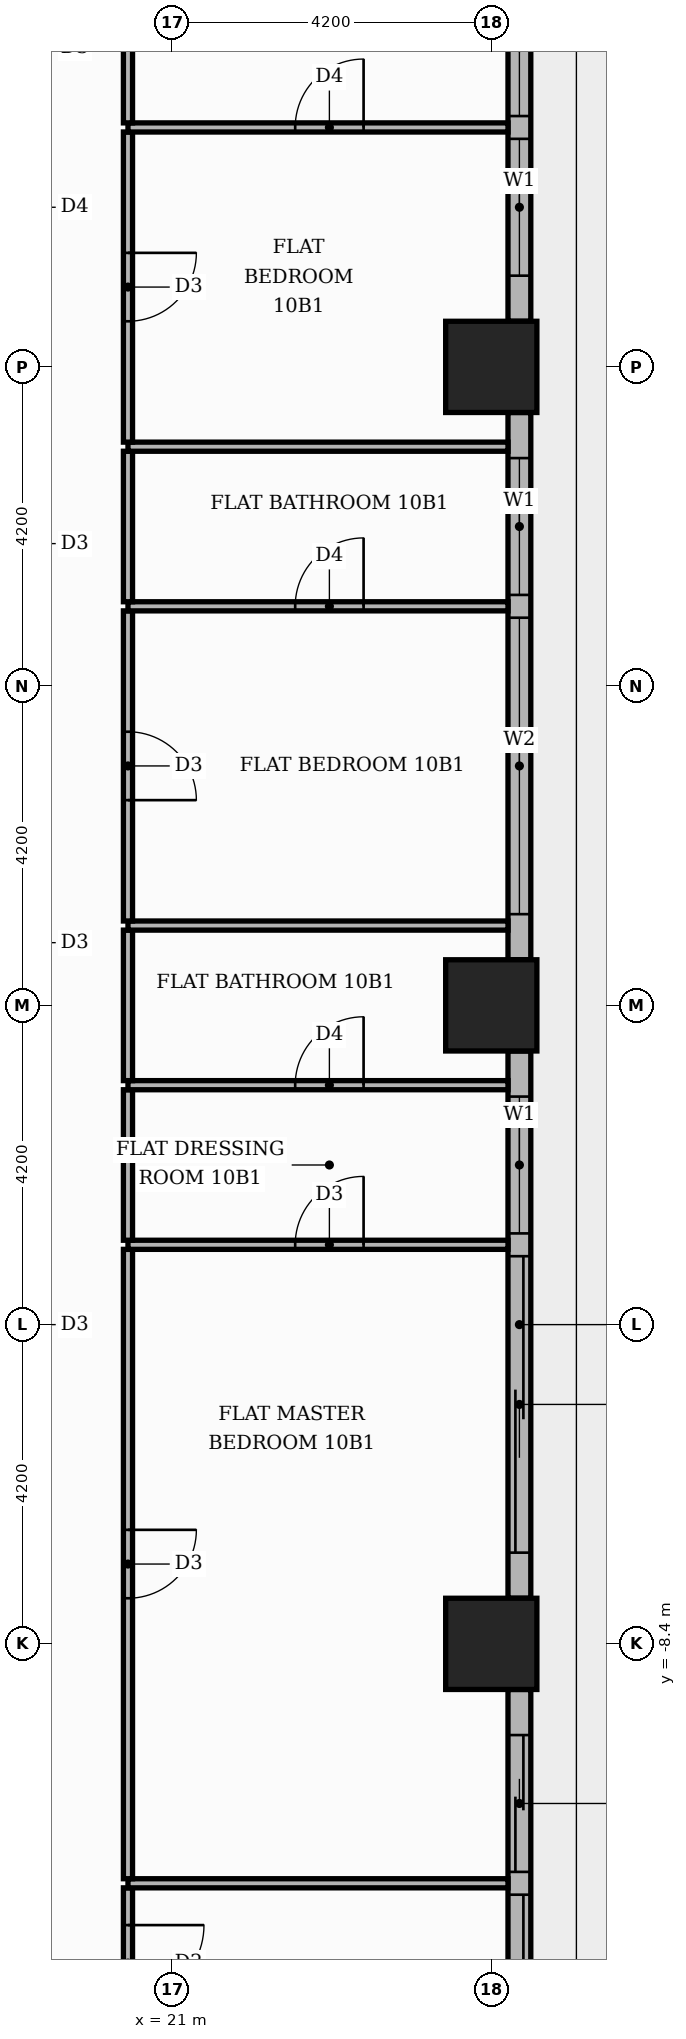
"""IFC4 building model, lengths in metres.
Left out: names, types, materials, properties, quantities, classifications, styles, units other than length and angle.
Written with IfcOpenShell. Run it as: python <this file> out.ifc"""

import sys

from ifc_helpers import new_model, si_unit, direction, frame, frame_2d, origin, origin_2d, place, context, subcontext, project, spatial, rectangle, extrude, element, fill, save


model = new_model("IFC4")
c1 = context("Model", 3, precision=1e-05, world=origin(), true_north=direction((0.0, 1.0)))
c2 = subcontext(c1, "Body", "Model", "MODEL_VIEW")
j1 = project(units=[si_unit("LENGTHUNIT", "METRE"), si_unit("PLANEANGLEUNIT", "RADIAN")], contexts=[c1])
p1 = place(None, origin())
s1 = spatial("IfcSite", under=j1, at=p1, CompositionType="ELEMENT")
p2 = place(p1, origin())
s2 = spatial("IfcBuilding", under=s1, at=p2, CompositionType="ELEMENT")
p3 = place(p2, frame((0.0, 0.0, 46.5)))
s3 = spatial("IfcBuildingStorey", under=s2, at=p3, CompositionType="ELEMENT", Elevation=46.5)
for number, where, z_axis, x_axis in (
    (1, (25.2, 0.0, 0.0), (0.0, 0.0, 1.0), (1.0, 0.0, 0.0)),
    (2, (25.2, 8.4, 0.0), (0.0, 0.0, 1.0), (1.0, 0.0, 0.0)),
    (3, (25.2, -8.4, 0.0), (0.0, 0.0, 1.0), (1.0, 0.0, 0.0)),
):
    element("IfcColumn", number, at=place(p3, frame(where, z_axis=z_axis, x_axis=x_axis)), inside=s3, PredefinedType="COLUMN", context=c2, shape_type="SweptSolid", body=[
        extrude(rectangle(XDim=1.2, YDim=1.2, at=origin_2d()), origin(), (0.0, 0.0, 1.0), 3.9),
    ])
p4 = place(p3, frame((25.57, -16.2, 0.0), z_axis=(0.0, 0.0, 1.0), x_axis=(0.0, 1.0, 0.0)))
e4 = element("IfcWall", 4, at=p4, inside=s3, PredefinedType="STANDARD", context=c2, shape_type="SweptSolid", body=[
    extrude(rectangle(XDim=7.2, YDim=0.3, at=frame_2d((3.6, 0.0))), origin(), (0.0, 0.0, 1.0), 3.48),
])
p5 = place(p4, frame((0.6, 0.0, 0.0)))
e5 = element("IfcOpeningElement", 5, at=p5, cuts=e4, PredefinedType="OPENING", context=c2, shape_type="SweptSolid", body=[
    extrude(rectangle(XDim=3.9, YDim=2.4, at=frame_2d((1.95, 1.2))), frame((0.0, 0.16, 0.0), z_axis=(0.0, -1.0, 0.0), x_axis=(1.0, 0.0, 0.0)), (0.0, 0.0, 1.0), 0.32),
])
p6 = place(p4, frame((4.8, 0.0, 0.0)))
e6 = element("IfcOpeningElement", 6, at=p6, cuts=e4, PredefinedType="OPENING", context=c2, shape_type="SweptSolid", body=[
    extrude(rectangle(XDim=1.8, YDim=2.4, at=frame_2d((0.9, 1.2))), frame((0.0, 0.16, 0.0), z_axis=(0.0, -1.0, 0.0), x_axis=(1.0, 0.0, 0.0)), (0.0, 0.0, 1.0), 0.32),
])
p7 = place(p3, frame((25.57, -7.8, 0.0), z_axis=(0.0, 0.0, 1.0), x_axis=(0.0, 1.0, 0.0)))
e7 = element("IfcWall", 7, at=p7, inside=s3, PredefinedType="STANDARD", context=c2, shape_type="SweptSolid", body=[
    extrude(rectangle(XDim=7.2, YDim=0.3, at=frame_2d((3.6, 0.0))), origin(), (0.0, 0.0, 1.0), 3.48),
])
p8 = place(p7, frame((0.6, 0.0, 0.0)))
e8 = element("IfcOpeningElement", 8, at=p8, cuts=e7, PredefinedType="OPENING", context=c2, shape_type="SweptSolid", body=[
    extrude(rectangle(XDim=3.9, YDim=2.4, at=frame_2d((1.95, 1.2))), frame((0.0, 0.16, 0.0), z_axis=(0.0, -1.0, 0.0), x_axis=(1.0, 0.0, 0.0)), (0.0, 0.0, 1.0), 0.32),
])
p9 = place(p7, frame((4.8, 0.0, 0.9)))
e9 = element("IfcOpeningElement", 9, at=p9, cuts=e7, PredefinedType="OPENING", context=c2, shape_type="SweptSolid", body=[
    extrude(rectangle(XDim=1.8, YDim=2.1, at=frame_2d((0.9, 1.05))), frame((0.0, 0.16, 0.0), z_axis=(0.0, -1.0, 0.0), x_axis=(1.0, 0.0, 0.0)), (0.0, 0.0, 1.0), 0.32),
])
p10 = place(p3, frame((25.57, 0.6, 0.0), z_axis=(0.0, 0.0, 1.0), x_axis=(0.0, 1.0, 0.0)))
e10 = element("IfcWall", 10, at=p10, inside=s3, PredefinedType="STANDARD", context=c2, shape_type="SweptSolid", body=[
    extrude(rectangle(XDim=7.2, YDim=0.3, at=frame_2d((3.6, 0.0))), origin(), (0.0, 0.0, 1.0), 3.48),
])
p11 = place(p10, frame((0.6, 0.0, 0.9)))
e11 = element("IfcOpeningElement", 11, at=p11, cuts=e10, PredefinedType="OPENING", context=c2, shape_type="SweptSolid", body=[
    extrude(rectangle(XDim=3.9, YDim=2.1, at=frame_2d((1.95, 1.05))), frame((0.0, 0.16, 0.0), z_axis=(0.0, -1.0, 0.0), x_axis=(1.0, 0.0, 0.0)), (0.0, 0.0, 1.0), 0.32),
])
p12 = place(p10, frame((4.8, 0.0, 0.9)))
e12 = element("IfcOpeningElement", 12, at=p12, cuts=e10, PredefinedType="OPENING", context=c2, shape_type="SweptSolid", body=[
    extrude(rectangle(XDim=1.8, YDim=2.1, at=frame_2d((0.9, 1.05))), frame((0.0, 0.16, 0.0), z_axis=(0.0, -1.0, 0.0), x_axis=(1.0, 0.0, 0.0)), (0.0, 0.0, 1.0), 0.32),
])
p13 = place(p3, frame((25.57, 9.0, 0.0), z_axis=(0.0, 0.0, 1.0), x_axis=(0.0, 1.0, 0.0)))
e13 = element("IfcWall", 13, at=p13, inside=s3, PredefinedType="STANDARD", context=c2, shape_type="SweptSolid", body=[
    extrude(rectangle(XDim=7.2, YDim=0.3, at=frame_2d((3.6, 0.0))), origin(), (0.0, 0.0, 1.0), 3.48),
])
p14 = place(p13, frame((0.6, 0.0, 0.9)))
e14 = element("IfcOpeningElement", 14, at=p14, cuts=e13, PredefinedType="OPENING", context=c2, shape_type="SweptSolid", body=[
    extrude(rectangle(XDim=1.8, YDim=2.1, at=frame_2d((0.9, 1.05))), frame((0.0, 0.16, 0.0), z_axis=(0.0, -1.0, 0.0), x_axis=(1.0, 0.0, 0.0)), (0.0, 0.0, 1.0), 0.32),
])
p15 = place(p13, frame((2.7, 0.0, 0.9)))
e15 = element("IfcOpeningElement", 15, at=p15, cuts=e13, PredefinedType="OPENING", context=c2, shape_type="SweptSolid", body=[
    extrude(rectangle(XDim=1.8, YDim=2.1, at=frame_2d((0.9, 1.05))), frame((0.0, 0.16, 0.0), z_axis=(0.0, -1.0, 0.0), x_axis=(1.0, 0.0, 0.0)), (0.0, 0.0, 1.0), 0.32),
])
p16 = place(p13, frame((4.8, 0.0, 0.9)))
e16 = element("IfcOpeningElement", 16, at=p16, cuts=e13, PredefinedType="OPENING", context=c2, shape_type="SweptSolid", body=[
    extrude(rectangle(XDim=1.8, YDim=2.1, at=frame_2d((0.9, 1.05))), frame((0.0, 0.16, 0.0), z_axis=(0.0, -1.0, 0.0), x_axis=(1.0, 0.0, 0.0)), (0.0, 0.0, 1.0), 0.32),
])
p17 = place(p3, frame((20.42, -13.59, 0.0), z_axis=(0.0, 0.0, 1.0), x_axis=(0.0, 1.0, 0.0)))
e17 = element("IfcWall", 17, at=p17, inside=s3, PredefinedType="PARTITIONING", context=c2, shape_type="SweptSolid", body=[
    extrude(rectangle(XDim=1.98, YDim=0.12, at=frame_2d((0.99, 0.0))), origin(), (0.0, 0.0, 1.0), 3.48),
])
p18 = place(p17, frame((0.49, 0.0, 0.0)))
e18 = element("IfcOpeningElement", 18, at=p18, cuts=e17, PredefinedType="OPENING", context=c2, shape_type="SweptSolid", body=[
    extrude(rectangle(XDim=1.0, YDim=2.1, at=frame_2d((0.5, 1.05))), frame((0.0, 0.07, 0.0), z_axis=(0.0, -1.0, 0.0), x_axis=(1.0, 0.0, 0.0)), (0.0, 0.0, 1.0), 0.14),
])
p19 = place(p3, frame((20.42, -11.55, 0.0), z_axis=(0.0, 0.0, 1.0), x_axis=(1.0, 0.0, 0.0)))
e19 = element("IfcWall", 19, at=p19, inside=s3, PredefinedType="PARTITIONING", context=c2, shape_type="SweptSolid", body=[
    extrude(rectangle(XDim=5.0, YDim=0.12, at=frame_2d((2.5, 0.0))), origin(), (0.0, 0.0, 1.0), 3.48),
])
p20 = place(p3, frame((20.42, -11.49, 0.0), z_axis=(0.0, 0.0, 1.0), x_axis=(0.0, 1.0, 0.0)))
e20 = element("IfcWall", 20, at=p20, inside=s3, PredefinedType="PARTITIONING", context=c2, shape_type="SweptSolid", body=[
    extrude(rectangle(XDim=8.28, YDim=0.12, at=frame_2d((4.14, 0.0))), origin(), (0.0, 0.0, 1.0), 3.48),
])
p21 = place(p20, frame((3.69, 0.0, 0.0)))
e21 = element("IfcOpeningElement", 21, at=p21, cuts=e20, PredefinedType="OPENING", context=c2, shape_type="SweptSolid", body=[
    extrude(rectangle(XDim=0.9, YDim=2.1, at=frame_2d((0.45, 1.05))), frame((0.0, 0.07, 0.0), z_axis=(0.0, -1.0, 0.0), x_axis=(1.0, 0.0, 0.0)), (0.0, 0.0, 1.0), 0.14),
])
p22 = place(p3, frame((20.42, -3.15, 0.0), z_axis=(0.0, 0.0, 1.0), x_axis=(1.0, 0.0, 0.0)))
e22 = element("IfcWall", 22, at=p22, inside=s3, PredefinedType="PARTITIONING", context=c2, shape_type="SweptSolid", body=[
    extrude(rectangle(XDim=5.0, YDim=0.12, at=frame_2d((2.5, 0.0))), origin(), (0.0, 0.0, 1.0), 3.48),
])
p23 = place(p22, frame((2.2, 0.0, 0.0)))
e23 = element("IfcOpeningElement", 23, at=p23, cuts=e22, PredefinedType="OPENING", context=c2, shape_type="SweptSolid", body=[
    extrude(rectangle(XDim=0.9, YDim=2.1, at=frame_2d((0.45, 1.05))), frame((0.0, 0.07, 0.0), z_axis=(0.0, -1.0, 0.0), x_axis=(1.0, 0.0, 0.0)), (0.0, 0.0, 1.0), 0.14),
])
p24 = place(p3, frame((20.42, -3.09, 0.0), z_axis=(0.0, 0.0, 1.0), x_axis=(0.0, 1.0, 0.0)))
e24 = element("IfcWall", 24, at=p24, inside=s3, PredefinedType="PARTITIONING", context=c2, shape_type="SweptSolid", body=[
    extrude(rectangle(XDim=1.98, YDim=0.12, at=frame_2d((0.99, 0.0))), origin(), (0.0, 0.0, 1.0), 3.48),
])
p25 = place(p3, frame((20.42, -1.05, 0.0), z_axis=(0.0, 0.0, 1.0), x_axis=(1.0, 0.0, 0.0)))
e25 = element("IfcWall", 25, at=p25, inside=s3, PredefinedType="PARTITIONING", context=c2, shape_type="SweptSolid", body=[
    extrude(rectangle(XDim=5.0, YDim=0.12, at=frame_2d((2.5, 0.0))), origin(), (0.0, 0.0, 1.0), 3.48),
])
p26 = place(p25, frame((2.2, 0.0, 0.0)))
e26 = element("IfcOpeningElement", 26, at=p26, cuts=e25, PredefinedType="OPENING", context=c2, shape_type="SweptSolid", body=[
    extrude(rectangle(XDim=0.9, YDim=2.1, at=frame_2d((0.45, 1.05))), frame((0.0, 0.07, 0.0), z_axis=(0.0, -1.0, 0.0), x_axis=(1.0, 0.0, 0.0)), (0.0, 0.0, 1.0), 0.14),
])
p27 = place(p3, frame((20.42, -0.99, 0.0), z_axis=(0.0, 0.0, 1.0), x_axis=(0.0, 1.0, 0.0)))
e27 = element("IfcWall", 27, at=p27, inside=s3, PredefinedType="PARTITIONING", context=c2, shape_type="SweptSolid", body=[
    extrude(rectangle(XDim=1.98, YDim=0.12, at=frame_2d((0.99, 0.0))), origin(), (0.0, 0.0, 1.0), 3.48),
])
p28 = place(p3, frame((20.42, 1.05, 0.0), z_axis=(0.0, 0.0, 1.0), x_axis=(1.0, 0.0, 0.0)))
e28 = element("IfcWall", 28, at=p28, inside=s3, PredefinedType="PARTITIONING", context=c2, shape_type="SweptSolid", body=[
    extrude(rectangle(XDim=5.0, YDim=0.12, at=frame_2d((2.5, 0.0))), origin(), (0.0, 0.0, 1.0), 3.48),
])
p29 = place(p3, frame((20.42, 1.11, 0.0), z_axis=(0.0, 0.0, 1.0), x_axis=(0.0, 1.0, 0.0)))
e29 = element("IfcWall", 29, at=p29, inside=s3, PredefinedType="PARTITIONING", context=c2, shape_type="SweptSolid", body=[
    extrude(rectangle(XDim=4.08, YDim=0.12, at=frame_2d((2.04, 0.0))), origin(), (0.0, 0.0, 1.0), 3.48),
])
p30 = place(p29, frame((1.59, 0.0, 0.0)))
e30 = element("IfcOpeningElement", 30, at=p30, cuts=e29, PredefinedType="OPENING", context=c2, shape_type="SweptSolid", body=[
    extrude(rectangle(XDim=0.9, YDim=2.1, at=frame_2d((0.45, 1.05))), frame((0.0, 0.07, 0.0), z_axis=(0.0, -1.0, 0.0), x_axis=(1.0, 0.0, 0.0)), (0.0, 0.0, 1.0), 0.14),
])
p31 = place(p3, frame((20.42, 5.25, 0.0), z_axis=(0.0, 0.0, 1.0), x_axis=(1.0, 0.0, 0.0)))
e31 = element("IfcWall", 31, at=p31, inside=s3, PredefinedType="PARTITIONING", context=c2, shape_type="SweptSolid", body=[
    extrude(rectangle(XDim=5.0, YDim=0.12, at=frame_2d((2.5, 0.0))), origin(), (0.0, 0.0, 1.0), 3.48),
])
p32 = place(p31, frame((2.2, 0.0, 0.0)))
e32 = element("IfcOpeningElement", 32, at=p32, cuts=e31, PredefinedType="OPENING", context=c2, shape_type="SweptSolid", body=[
    extrude(rectangle(XDim=0.9, YDim=2.1, at=frame_2d((0.45, 1.05))), frame((0.0, 0.07, 0.0), z_axis=(0.0, -1.0, 0.0), x_axis=(1.0, 0.0, 0.0)), (0.0, 0.0, 1.0), 0.14),
])
p33 = place(p3, frame((20.42, 5.31, 0.0), z_axis=(0.0, 0.0, 1.0), x_axis=(0.0, 1.0, 0.0)))
e33 = element("IfcWall", 33, at=p33, inside=s3, PredefinedType="PARTITIONING", context=c2, shape_type="SweptSolid", body=[
    extrude(rectangle(XDim=1.98, YDim=0.12, at=frame_2d((0.99, 0.0))), origin(), (0.0, 0.0, 1.0), 3.48),
])
p34 = place(p3, frame((20.42, 7.35, 0.0), z_axis=(0.0, 0.0, 1.0), x_axis=(1.0, 0.0, 0.0)))
e34 = element("IfcWall", 34, at=p34, inside=s3, PredefinedType="PARTITIONING", context=c2, shape_type="SweptSolid", body=[
    extrude(rectangle(XDim=5.0, YDim=0.12, at=frame_2d((2.5, 0.0))), origin(), (0.0, 0.0, 1.0), 3.48),
])
p35 = place(p3, frame((20.42, 7.41, 0.0), z_axis=(0.0, 0.0, 1.0), x_axis=(0.0, 1.0, 0.0)))
e35 = element("IfcWall", 35, at=p35, inside=s3, PredefinedType="PARTITIONING", context=c2, shape_type="SweptSolid", body=[
    extrude(rectangle(XDim=4.08, YDim=0.12, at=frame_2d((2.04, 0.0))), origin(), (0.0, 0.0, 1.0), 3.48),
])
p36 = place(p35, frame((1.59, 0.0, 0.0)))
e36 = element("IfcOpeningElement", 36, at=p36, cuts=e35, PredefinedType="OPENING", context=c2, shape_type="SweptSolid", body=[
    extrude(rectangle(XDim=0.9, YDim=2.1, at=frame_2d((0.45, 1.05))), frame((0.0, 0.07, 0.0), z_axis=(0.0, -1.0, 0.0), x_axis=(1.0, 0.0, 0.0)), (0.0, 0.0, 1.0), 0.14),
])
p37 = place(p3, frame((20.42, 11.55, 0.0), z_axis=(0.0, 0.0, 1.0), x_axis=(1.0, 0.0, 0.0)))
e37 = element("IfcWall", 37, at=p37, inside=s3, PredefinedType="PARTITIONING", context=c2, shape_type="SweptSolid", body=[
    extrude(rectangle(XDim=5.0, YDim=0.12, at=frame_2d((2.5, 0.0))), origin(), (0.0, 0.0, 1.0), 3.48),
])
p38 = place(p37, frame((2.2, 0.0, 0.0)))
e38 = element("IfcOpeningElement", 38, at=p38, cuts=e37, PredefinedType="OPENING", context=c2, shape_type="SweptSolid", body=[
    extrude(rectangle(XDim=0.9, YDim=2.1, at=frame_2d((0.45, 1.05))), frame((0.0, 0.07, 0.0), z_axis=(0.0, -1.0, 0.0), x_axis=(1.0, 0.0, 0.0)), (0.0, 0.0, 1.0), 0.14),
])
p39 = place(p3, frame((20.42, 11.61, 0.0), z_axis=(0.0, 0.0, 1.0), x_axis=(0.0, 1.0, 0.0)))
e39 = element("IfcWall", 39, at=p39, inside=s3, PredefinedType="PARTITIONING", context=c2, shape_type="SweptSolid", body=[
    extrude(rectangle(XDim=1.94, YDim=0.12, at=frame_2d((0.97, 0.0))), origin(), (0.0, 0.0, 1.0), 3.48),
])
p40 = place(p5, origin())
e40 = element("IfcDoor", 40, at=p40, inside=s3, OperationType="SLIDING_TO_LEFT", PredefinedType="DOOR", context=c2, shape_type="SweptSolid", body=[
    extrude(rectangle(XDim=3.9, YDim=2.4, at=frame_2d((1.95, 1.2))), frame((0.0, 0.025, 0.0), z_axis=(0.0, -1.0, 0.0), x_axis=(1.0, 0.0, 0.0)), (0.0, 0.0, 1.0), 0.05),
])
fill(e5, e40)
p41 = place(p6, origin())
e41 = element("IfcDoor", 41, at=p41, inside=s3, OperationType="SLIDING_TO_RIGHT", PredefinedType="DOOR", context=c2, shape_type="SweptSolid", body=[
    extrude(rectangle(XDim=1.8, YDim=2.4, at=frame_2d((0.9, 1.2))), frame((0.0, 0.025, 0.0), z_axis=(0.0, -1.0, 0.0), x_axis=(1.0, 0.0, 0.0)), (0.0, 0.0, 1.0), 0.05),
])
fill(e6, e41)
p42 = place(p8, origin())
e42 = element("IfcDoor", 42, at=p42, inside=s3, OperationType="SLIDING_TO_LEFT", PredefinedType="DOOR", context=c2, shape_type="SweptSolid", body=[
    extrude(rectangle(XDim=3.9, YDim=2.4, at=frame_2d((1.95, 1.2))), frame((0.0, 0.025, 0.0), z_axis=(0.0, -1.0, 0.0), x_axis=(1.0, 0.0, 0.0)), (0.0, 0.0, 1.0), 0.05),
])
fill(e8, e42)
p43 = place(p9, origin())
e43 = element("IfcWindow", 43, at=p43, inside=s3, PartitioningType="SINGLE_PANEL", PredefinedType="WINDOW", context=c2, shape_type="SweptSolid", body=[
    extrude(rectangle(XDim=1.8, YDim=2.1, at=frame_2d((0.9, 1.05))), frame((0.0, 0.03, 0.0), z_axis=(0.0, -1.0, 0.0), x_axis=(1.0, 0.0, 0.0)), (0.0, 0.0, 1.0), 0.06),
])
fill(e9, e43)
p44 = place(p11, origin())
e44 = element("IfcWindow", 44, at=p44, inside=s3, PartitioningType="SINGLE_PANEL", PredefinedType="WINDOW", context=c2, shape_type="SweptSolid", body=[
    extrude(rectangle(XDim=3.9, YDim=2.1, at=frame_2d((1.95, 1.05))), frame((0.0, 0.03, 0.0), z_axis=(0.0, -1.0, 0.0), x_axis=(1.0, 0.0, 0.0)), (0.0, 0.0, 1.0), 0.06),
])
fill(e11, e44)
p45 = place(p12, origin())
e45 = element("IfcWindow", 45, at=p45, inside=s3, PartitioningType="SINGLE_PANEL", PredefinedType="WINDOW", context=c2, shape_type="SweptSolid", body=[
    extrude(rectangle(XDim=1.8, YDim=2.1, at=frame_2d((0.9, 1.05))), frame((0.0, 0.03, 0.0), z_axis=(0.0, -1.0, 0.0), x_axis=(1.0, 0.0, 0.0)), (0.0, 0.0, 1.0), 0.06),
])
fill(e12, e45)
p46 = place(p14, origin())
e46 = element("IfcWindow", 46, at=p46, inside=s3, PartitioningType="SINGLE_PANEL", PredefinedType="WINDOW", context=c2, shape_type="SweptSolid", body=[
    extrude(rectangle(XDim=1.8, YDim=2.1, at=frame_2d((0.9, 1.05))), frame((0.0, 0.03, 0.0), z_axis=(0.0, -1.0, 0.0), x_axis=(1.0, 0.0, 0.0)), (0.0, 0.0, 1.0), 0.06),
])
fill(e14, e46)
p47 = place(p15, origin())
e47 = element("IfcWindow", 47, at=p47, inside=s3, PartitioningType="SINGLE_PANEL", PredefinedType="WINDOW", context=c2, shape_type="SweptSolid", body=[
    extrude(rectangle(XDim=1.8, YDim=2.1, at=frame_2d((0.9, 1.05))), frame((0.0, 0.03, 0.0), z_axis=(0.0, -1.0, 0.0), x_axis=(1.0, 0.0, 0.0)), (0.0, 0.0, 1.0), 0.06),
])
fill(e15, e47)
p48 = place(p18, frame((1.0, 0.0, 0.0), z_axis=(0.0, 0.0, 1.0), x_axis=(-1.0, 0.0, 0.0)))
e48 = element("IfcDoor", 48, at=p48, inside=s3, OperationType="SINGLE_SWING_RIGHT", PredefinedType="DOOR", context=c2, shape_type="SweptSolid", body=[
    extrude(rectangle(XDim=1.0, YDim=2.1, at=frame_2d((0.5, 1.05))), frame((0.0, 0.025, 0.0), z_axis=(0.0, -1.0, 0.0), x_axis=(1.0, 0.0, 0.0)), (0.0, 0.0, 1.0), 0.05),
])
fill(e18, e48)
p49 = place(p21, frame((0.9, 0.0, 0.0), z_axis=(0.0, 0.0, 1.0), x_axis=(-1.0, 0.0, 0.0)))
e49 = element("IfcDoor", 49, at=p49, inside=s3, OperationType="SINGLE_SWING_RIGHT", PredefinedType="DOOR", context=c2, shape_type="SweptSolid", body=[
    extrude(rectangle(XDim=0.9, YDim=2.1, at=frame_2d((0.45, 1.05))), frame((0.0, 0.025, 0.0), z_axis=(0.0, -1.0, 0.0), x_axis=(1.0, 0.0, 0.0)), (0.0, 0.0, 1.0), 0.05),
])
fill(e21, e49)
p50 = place(p23, origin())
e50 = element("IfcDoor", 50, at=p50, inside=s3, OperationType="SINGLE_SWING_RIGHT", PredefinedType="DOOR", context=c2, shape_type="SweptSolid", body=[
    extrude(rectangle(XDim=0.9, YDim=2.1, at=frame_2d((0.45, 1.05))), frame((0.0, 0.025, 0.0), z_axis=(0.0, -1.0, 0.0), x_axis=(1.0, 0.0, 0.0)), (0.0, 0.0, 1.0), 0.05),
])
fill(e23, e50)
p51 = place(p26, origin())
e51 = element("IfcDoor", 51, at=p51, inside=s3, OperationType="SINGLE_SWING_RIGHT", PredefinedType="DOOR", context=c2, shape_type="SweptSolid", body=[
    extrude(rectangle(XDim=0.9, YDim=2.1, at=frame_2d((0.45, 1.05))), frame((0.0, 0.025, 0.0), z_axis=(0.0, -1.0, 0.0), x_axis=(1.0, 0.0, 0.0)), (0.0, 0.0, 1.0), 0.05),
])
fill(e26, e51)
p52 = place(p30, frame((0.9, 0.0, 0.0), z_axis=(0.0, 0.0, 1.0), x_axis=(-1.0, 0.0, 0.0)))
e52 = element("IfcDoor", 52, at=p52, inside=s3, OperationType="SINGLE_SWING_LEFT", PredefinedType="DOOR", context=c2, shape_type="SweptSolid", body=[
    extrude(rectangle(XDim=0.9, YDim=2.1, at=frame_2d((0.45, 1.05))), frame((0.0, 0.025, 0.0), z_axis=(0.0, -1.0, 0.0), x_axis=(1.0, 0.0, 0.0)), (0.0, 0.0, 1.0), 0.05),
])
fill(e30, e52)
p53 = place(p32, origin())
e53 = element("IfcDoor", 53, at=p53, inside=s3, OperationType="SINGLE_SWING_RIGHT", PredefinedType="DOOR", context=c2, shape_type="SweptSolid", body=[
    extrude(rectangle(XDim=0.9, YDim=2.1, at=frame_2d((0.45, 1.05))), frame((0.0, 0.025, 0.0), z_axis=(0.0, -1.0, 0.0), x_axis=(1.0, 0.0, 0.0)), (0.0, 0.0, 1.0), 0.05),
])
fill(e32, e53)
p54 = place(p36, frame((0.9, 0.0, 0.0), z_axis=(0.0, 0.0, 1.0), x_axis=(-1.0, 0.0, 0.0)))
e54 = element("IfcDoor", 54, at=p54, inside=s3, OperationType="SINGLE_SWING_RIGHT", PredefinedType="DOOR", context=c2, shape_type="SweptSolid", body=[
    extrude(rectangle(XDim=0.9, YDim=2.1, at=frame_2d((0.45, 1.05))), frame((0.0, 0.025, 0.0), z_axis=(0.0, -1.0, 0.0), x_axis=(1.0, 0.0, 0.0)), (0.0, 0.0, 1.0), 0.05),
])
fill(e36, e54)
p55 = place(p38, origin())
e55 = element("IfcDoor", 55, at=p55, inside=s3, OperationType="SINGLE_SWING_RIGHT", PredefinedType="DOOR", context=c2, shape_type="SweptSolid", body=[
    extrude(rectangle(XDim=0.9, YDim=2.1, at=frame_2d((0.45, 1.05))), frame((0.0, 0.025, 0.0), z_axis=(0.0, -1.0, 0.0), x_axis=(1.0, 0.0, 0.0)), (0.0, 0.0, 1.0), 0.05),
])
fill(e38, e55)
save(model, sys.argv[1])
